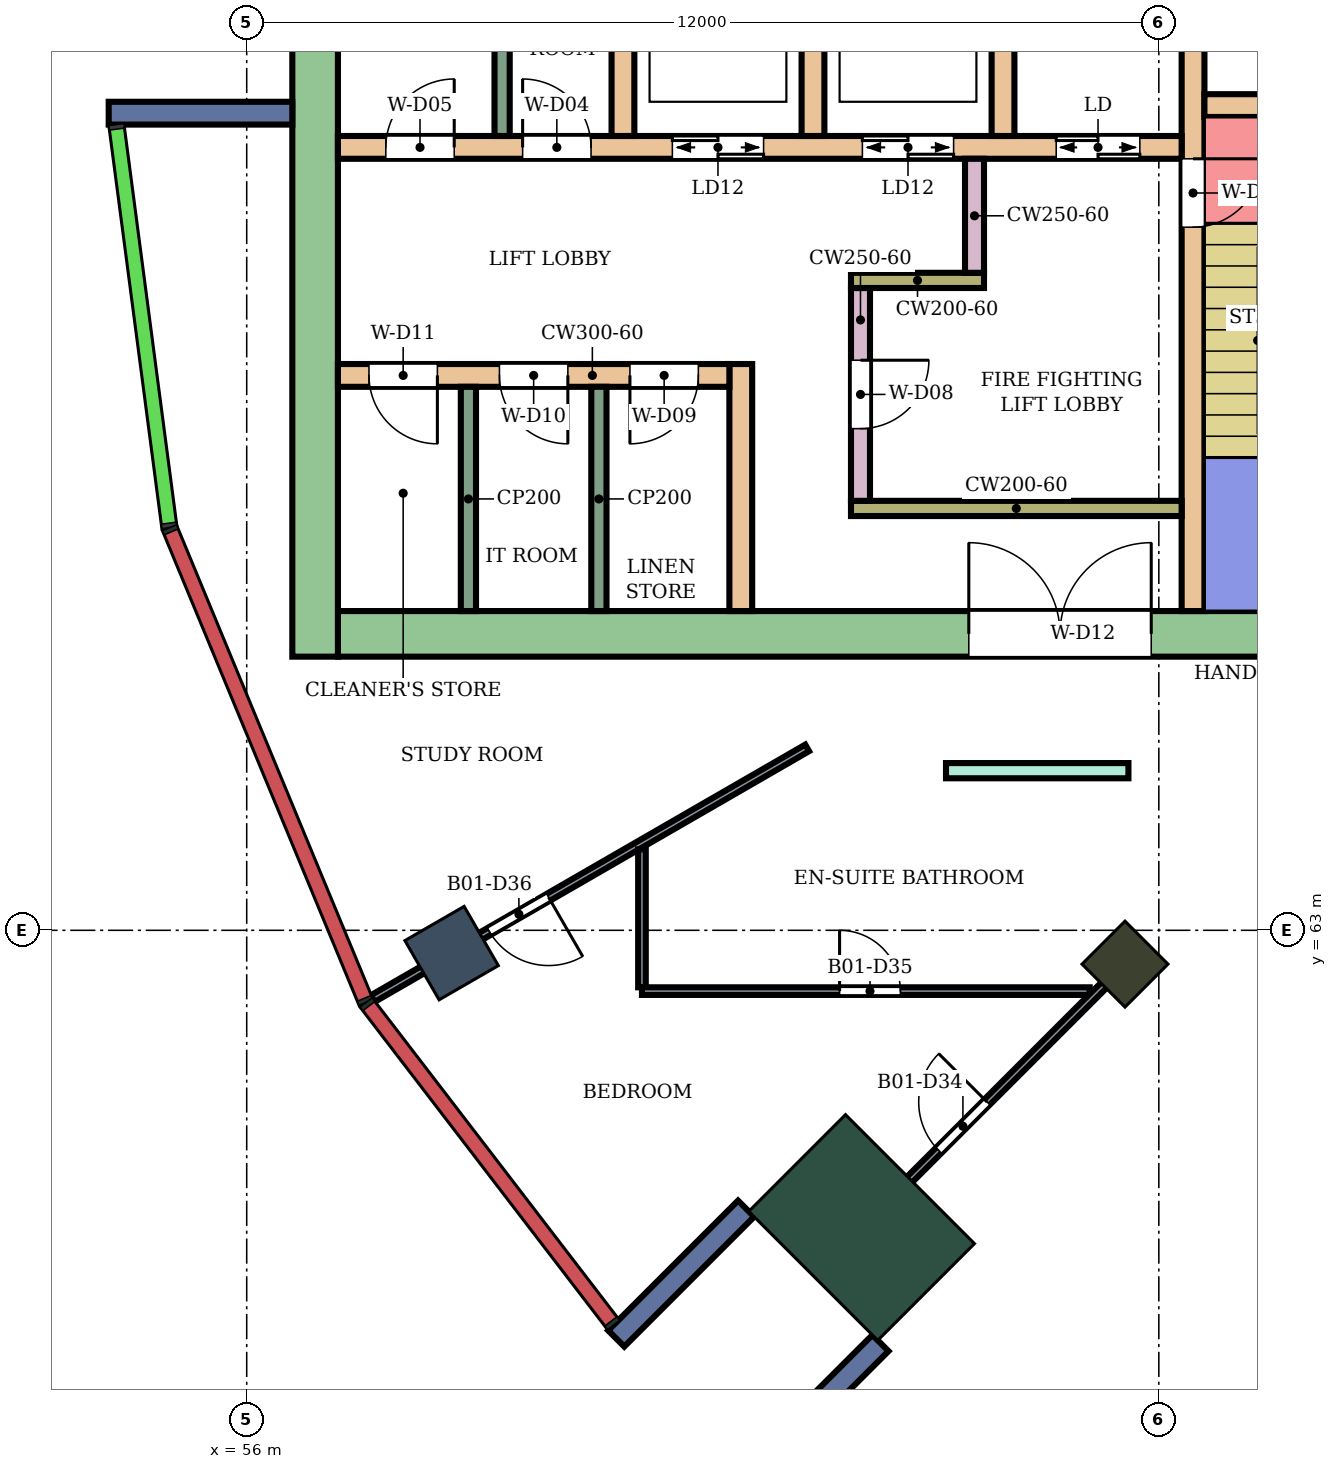
"""IFC4 building model, lengths in metres.
Left out: names, types, materials, properties, quantities, classifications, styles, units other than length and angle.
Written with IfcOpenShell. Run it as: python <this file> out.ifc"""

import sys

from ifc_helpers import new_model, si_unit, direction, frame, frame_2d, origin, origin_2d, place, context, subcontext, project, spatial, rectangle, extrude, element, fill, save


model = new_model("IFC4")
c1 = context("Model", 3, precision=1e-05, world=origin(), true_north=direction((0.0, 1.0)))
c2 = subcontext(c1, "Body", "Model", "MODEL_VIEW")
j1 = project(units=[si_unit("LENGTHUNIT", "METRE"), si_unit("PLANEANGLEUNIT", "RADIAN")], contexts=[c1])
p1 = place(None, origin())
s1 = spatial("IfcSite", under=j1, at=p1, CompositionType="ELEMENT")
p2 = place(p1, origin())
s2 = spatial("IfcBuilding", under=s1, at=p2, CompositionType="ELEMENT")
p3 = place(p2, frame((0.0, 0.0, 216.7)))
s3 = spatial("IfcBuildingStorey", under=s2, at=p3, CompositionType="ELEMENT", Elevation=216.7)
p4 = place(p3, frame((58.696, 62.7, 0.0), z_axis=(0.0, 0.0, 1.0), x_axis=(-0.866025403784, -0.5, 0.0)))
e1 = element("IfcColumn", 1, at=p4, inside=s3, PredefinedType="COLUMN", context=c2, shape_type="SweptSolid", body=[
    extrude(rectangle(XDim=0.9, YDim=0.9, at=origin_2d()), origin(), (0.0, 0.0, 1.0), 4.2),
])
p5 = place(p3, frame((67.555, 62.555, 0.0), z_axis=(0.0, 0.0, 1.0), x_axis=(-0.707106781187, -0.707106781187, 0.0)))
e2 = element("IfcColumn", 2, at=p5, inside=s3, PredefinedType="COLUMN", context=c2, shape_type="SweptSolid", body=[
    extrude(rectangle(XDim=0.8, YDim=0.8, at=origin_2d()), origin(), (0.0, 0.0, 1.0), 4.2),
])
p6 = place(p3, frame((64.09, 59.09, 0.0), z_axis=(0.0, 0.0, 1.0), x_axis=(-0.707106781187, -0.707106781187, 0.0)))
e3 = element("IfcColumn", 3, at=p6, inside=s3, PredefinedType="COLUMN", context=c2, shape_type="SweptSolid", body=[
    extrude(rectangle(XDim=1.8, YDim=2.4, at=origin_2d()), origin(), (0.0, 0.0, 1.0), 4.2),
])
p7 = place(p3, frame((72.1, 66.9, 0.0), z_axis=(0.0, 0.0, 1.0), x_axis=(-1.0, 0.0, 0.0)))
e4 = element("IfcWall", 4, at=p7, inside=s3, PredefinedType="SHEAR", context=c2, shape_type="SweptSolid", body=[
    extrude(rectangle(XDim=14.9, YDim=0.6, at=frame_2d((7.45, 0.0))), origin(), (0.0, 0.0, 1.0), 3.88),
])
p8 = place(p7, frame((4.2, 0.0, 0.0)))
e5 = element("IfcOpeningElement", 5, at=p8, cuts=e4, PredefinedType="OPENING", context=c2, shape_type="SweptSolid", body=[
    extrude(rectangle(XDim=2.4, YDim=2.4, at=frame_2d((1.2, 1.2))), frame((0.0, 0.31, 0.0), z_axis=(0.0, -1.0, 0.0), x_axis=(1.0, 0.0, 0.0)), (0.0, 0.0, 1.0), 0.62),
])
p9 = place(p3, frame((56.9, 83.4, 0.0), z_axis=(0.0, 0.0, 1.0), x_axis=(0.0, -1.0, 0.0)))
e6 = element("IfcWall", 6, at=p9, inside=s3, PredefinedType="SHEAR", context=c2, shape_type="SweptSolid", body=[
    extrude(rectangle(XDim=16.8, YDim=0.6, at=frame_2d((8.4, 0.0))), origin(), (0.0, 0.0, 1.0), 3.88),
])
p10 = place(p3, frame((68.45, 75.0, 0.0), z_axis=(0.0, 0.0, 1.0), x_axis=(0.0, -1.0, 0.0)))
e7 = element("IfcWall", 7, at=p10, inside=s3, PredefinedType="SHEAR", context=c2, shape_type="SweptSolid", body=[
    extrude(rectangle(XDim=7.8, YDim=0.3, at=frame_2d((3.9, 0.0))), origin(), (0.0, 0.0, 1.0), 3.88),
])
p11 = place(p10, frame((1.85, 0.0, 0.0)))
e8 = element("IfcOpeningElement", 8, at=p11, cuts=e7, PredefinedType="OPENING", context=c2, shape_type="SweptSolid", body=[
    extrude(rectangle(XDim=0.9, YDim=2.1, at=frame_2d((0.45, 1.05))), frame((0.0, 0.16, 0.0), z_axis=(0.0, -1.0, 0.0), x_axis=(1.0, 0.0, 0.0)), (0.0, 0.0, 1.0), 0.32),
])
p12 = place(p3, frame((71.65, 73.85, 0.0), z_axis=(0.0, 0.0, 1.0), x_axis=(-1.0, 0.0, 0.0)))
e9 = element("IfcWall", 9, at=p12, inside=s3, PredefinedType="SHEAR", context=c2, shape_type="SweptSolid", body=[
    extrude(rectangle(XDim=3.05, YDim=0.3, at=frame_2d((1.525, 0.0))), origin(), (0.0, 0.0, 1.0), 3.88),
])
p13 = place(p12, frame((1.1, 0.0, 0.0)))
e10 = element("IfcOpeningElement", 10, at=p13, cuts=e9, PredefinedType="OPENING", context=c2, shape_type="SweptSolid", body=[
    extrude(rectangle(XDim=0.7, YDim=2.0, at=frame_2d((0.35, 1.0))), frame((0.0, 0.16, 0.0), z_axis=(0.0, -1.0, 0.0), x_axis=(1.0, 0.0, 0.0)), (0.0, 0.0, 1.0), 0.32),
])
p14 = place(p3, frame((68.3, 73.3, 0.0), z_axis=(0.0, 0.0, 1.0), x_axis=(-1.0, 0.0, 0.0)))
e11 = element("IfcWall", 11, at=p14, inside=s3, PredefinedType="SHEAR", context=c2, shape_type="SweptSolid", body=[
    extrude(rectangle(XDim=11.1, YDim=0.3, at=frame_2d((5.55, 0.0))), origin(), (0.0, 0.0, 1.0), 3.88),
])
p15 = place(p14, frame((0.55, 0.0, 0.0)))
e12 = element("IfcOpeningElement", 12, at=p15, cuts=e11, PredefinedType="OPENING", context=c2, shape_type="SweptSolid", body=[
    extrude(rectangle(XDim=1.1, YDim=2.1, at=frame_2d((0.55, 1.05))), frame((0.0, 0.16, 0.0), z_axis=(0.0, -1.0, 0.0), x_axis=(1.0, 0.0, 0.0)), (0.0, 0.0, 1.0), 0.32),
])
p16 = place(p14, frame((3.0, 0.0, 0.0)))
e13 = element("IfcOpeningElement", 13, at=p16, cuts=e11, PredefinedType="OPENING", context=c2, shape_type="SweptSolid", body=[
    extrude(rectangle(XDim=1.2, YDim=2.1, at=frame_2d((0.6, 1.05))), frame((0.0, 0.16, 0.0), z_axis=(0.0, -1.0, 0.0), x_axis=(1.0, 0.0, 0.0)), (0.0, 0.0, 1.0), 0.32),
])
p17 = place(p14, frame((5.5, 0.0, 0.0)))
e14 = element("IfcOpeningElement", 14, at=p17, cuts=e11, PredefinedType="OPENING", context=c2, shape_type="SweptSolid", body=[
    extrude(rectangle(XDim=1.2, YDim=2.1, at=frame_2d((0.6, 1.05))), frame((0.0, 0.16, 0.0), z_axis=(0.0, -1.0, 0.0), x_axis=(1.0, 0.0, 0.0)), (0.0, 0.0, 1.0), 0.32),
])
p18 = place(p14, frame((7.77, 0.0, 0.0)))
e15 = element("IfcOpeningElement", 15, at=p18, cuts=e11, PredefinedType="OPENING", context=c2, shape_type="SweptSolid", body=[
    extrude(rectangle(XDim=0.9, YDim=2.1, at=frame_2d((0.45, 1.05))), frame((0.0, 0.16, 0.0), z_axis=(0.0, -1.0, 0.0), x_axis=(1.0, 0.0, 0.0)), (0.0, 0.0, 1.0), 0.32),
])
p19 = place(p14, frame((9.57, 0.0, 0.0)))
e16 = element("IfcOpeningElement", 16, at=p19, cuts=e11, PredefinedType="OPENING", context=c2, shape_type="SweptSolid", body=[
    extrude(rectangle(XDim=0.9, YDim=2.1, at=frame_2d((0.45, 1.05))), frame((0.0, 0.16, 0.0), z_axis=(0.0, -1.0, 0.0), x_axis=(1.0, 0.0, 0.0)), (0.0, 0.0, 1.0), 0.32),
])
for number, where, z_axis, x_axis in (
    (17, (65.95, 76.0, 0.0), (0.0, 0.0, 1.0), (0.0, -1.0, 0.0)),
    (18, (63.45, 76.0, 0.0), (0.0, 0.0, 1.0), (0.0, -1.0, 0.0)),
    (19, (60.95, 76.0, 0.0), (0.0, 0.0, 1.0), (0.0, -1.0, 0.0)),
):
    element("IfcWall", number, at=place(p3, frame(where, z_axis=z_axis, x_axis=x_axis)), inside=s3, PredefinedType="SHEAR", context=c2, shape_type="SweptSolid", body=[
        extrude(rectangle(XDim=2.55, YDim=0.3, at=frame_2d((1.275, 0.0))), origin(), (0.0, 0.0, 1.0), 3.88),
    ])
p20 = place(p3, frame((68.3, 68.55, 0.0), z_axis=(0.0, 0.0, 1.0), x_axis=(-1.0, 0.0, 0.0)))
e20 = element("IfcWall", 20, at=p20, inside=s3, PredefinedType="SHEAR", context=c2, shape_type="SweptSolid", body=[
    extrude(rectangle(XDim=4.35, YDim=0.2, at=frame_2d((2.175, 0.0))), origin(), (0.0, 0.0, 1.0), 3.88),
])
p21 = place(p3, frame((64.075, 71.45, 0.0), z_axis=(0.0, 0.0, 1.0), x_axis=(0.0, -1.0, 0.0)))
e21 = element("IfcWall", 21, at=p21, inside=s3, PredefinedType="SHEAR", context=c2, shape_type="SweptSolid", body=[
    extrude(rectangle(XDim=2.8, YDim=0.25, at=frame_2d((1.4, 0.0))), origin(), (0.0, 0.0, 1.0), 3.88),
])
p22 = place(p21, frame((0.95, 0.0, 0.0)))
e22 = element("IfcOpeningElement", 22, at=p22, cuts=e21, PredefinedType="OPENING", context=c2, shape_type="SweptSolid", body=[
    extrude(rectangle(XDim=0.9, YDim=2.1, at=frame_2d((0.45, 1.05))), frame((0.0, 0.135, 0.0), z_axis=(0.0, -1.0, 0.0), x_axis=(1.0, 0.0, 0.0)), (0.0, 0.0, 1.0), 0.27),
])
p23 = place(p3, frame((65.7, 71.55, 0.0), z_axis=(0.0, 0.0, 1.0), x_axis=(-1.0, 0.0, 0.0)))
e23 = element("IfcWall", 23, at=p23, inside=s3, PredefinedType="SHEAR", context=c2, shape_type="SweptSolid", body=[
    extrude(rectangle(XDim=1.75, YDim=0.2, at=frame_2d((0.875, 0.0))), origin(), (0.0, 0.0, 1.0), 3.88),
])
p24 = place(p3, frame((65.575, 73.15, 0.0), z_axis=(0.0, 0.0, 1.0), x_axis=(0.0, -1.0, 0.0)))
e24 = element("IfcWall", 24, at=p24, inside=s3, PredefinedType="SHEAR", context=c2, shape_type="SweptSolid", body=[
    extrude(rectangle(XDim=1.5, YDim=0.25, at=frame_2d((0.75, 0.0))), origin(), (0.0, 0.0, 1.0), 3.88),
])
p25 = place(p3, frame((62.5, 70.45, 0.0), z_axis=(0.0, 0.0, 1.0), x_axis=(0.0, -1.0, 0.0)))
e25 = element("IfcWall", 25, at=p25, inside=s3, PredefinedType="SHEAR", context=c2, shape_type="SweptSolid", body=[
    extrude(rectangle(XDim=3.25, YDim=0.3, at=frame_2d((1.625, 0.0))), origin(), (0.0, 0.0, 1.0), 3.88),
])
p26 = place(p3, frame((62.35, 70.3, 0.0), z_axis=(0.0, 0.0, 1.0), x_axis=(-1.0, 0.0, 0.0)))
e26 = element("IfcWall", 26, at=p26, inside=s3, PredefinedType="SHEAR", context=c2, shape_type="SweptSolid", body=[
    extrude(rectangle(XDim=5.15, YDim=0.3, at=frame_2d((2.575, 0.0))), origin(), (0.0, 0.0, 1.0), 3.88),
])
p27 = place(p26, frame((0.408, 0.0, 0.0)))
e27 = element("IfcOpeningElement", 27, at=p27, cuts=e26, PredefinedType="OPENING", context=c2, shape_type="SweptSolid", body=[
    extrude(rectangle(XDim=0.9, YDim=2.1, at=frame_2d((0.45, 1.05))), frame((0.0, 0.16, 0.0), z_axis=(0.0, -1.0, 0.0), x_axis=(1.0, 0.0, 0.0)), (0.0, 0.0, 1.0), 0.32),
])
p28 = place(p26, frame((2.125, 0.0, 0.0)))
e28 = element("IfcOpeningElement", 28, at=p28, cuts=e26, PredefinedType="OPENING", context=c2, shape_type="SweptSolid", body=[
    extrude(rectangle(XDim=0.9, YDim=2.1, at=frame_2d((0.45, 1.05))), frame((0.0, 0.16, 0.0), z_axis=(0.0, -1.0, 0.0), x_axis=(1.0, 0.0, 0.0)), (0.0, 0.0, 1.0), 0.32),
])
p29 = place(p26, frame((3.842, 0.0, 0.0)))
e29 = element("IfcOpeningElement", 29, at=p29, cuts=e26, PredefinedType="OPENING", context=c2, shape_type="SweptSolid", body=[
    extrude(rectangle(XDim=0.9, YDim=2.1, at=frame_2d((0.45, 1.05))), frame((0.0, 0.16, 0.0), z_axis=(0.0, -1.0, 0.0), x_axis=(1.0, 0.0, 0.0)), (0.0, 0.0, 1.0), 0.32),
])
for number, where, z_axis, x_axis in (
    (30, (56.6, 73.75, 0.0), (0.0, 0.0, 1.0), (-1.0, 0.0, 0.0)),
    (31, (62.57, 59.338, 0.0), (0.0, 0.0, 1.0), (-0.707, -0.707, 0.0)),
    (32, (64.338, 57.57, 0.0), (0.0, 0.0, 1.0), (-0.707, -0.707, 0.0)),
):
    element("IfcWall", number, at=place(p3, frame(where, z_axis=z_axis, x_axis=x_axis)), inside=s3, PredefinedType="NOTDEFINED", context=c2, shape_type="SweptSolid", body=[
        extrude(rectangle(XDim=2.416, YDim=0.3, at=frame_2d((1.208, 0.0))), origin(), (0.0, 0.0, 1.0), 4.2),
    ])
p30 = place(p3, frame((65.2, 65.1, 0.0), z_axis=(0.0, 0.0, 1.0), x_axis=(1.0, 0.0, 0.0)))
e33 = element("IfcWall", 33, at=p30, inside=s3, PredefinedType="PARTITIONING", context=c2, shape_type="SweptSolid", body=[
    extrude(rectangle(XDim=2.4, YDim=0.2, at=frame_2d((1.2, 0.0))), origin(), (0.0, 0.0, 1.0), 3.75),
])
p31 = place(p3, frame((67.099, 52.66, 0.0), z_axis=(0.0, 0.0, 1.0), x_axis=(0.500120472712, 0.865955837658, 0.0)))
e34 = element("IfcWall", 34, at=p31, inside=s3, PredefinedType="PARTITIONING", context=c2, shape_type="SweptSolid", body=[
    extrude(rectangle(XDim=12.866, YDim=0.2, at=frame_2d((6.433, 0.0))), origin(), (0.0, 0.0, 1.0), 3.75),
])
p32 = place(p3, frame((57.658, 62.102, 0.0), z_axis=(0.0, 0.0, 1.0), x_axis=(0.866131372301, 0.499816412211, 0.0)))
e35 = element("IfcWall", 35, at=p32, inside=s3, PredefinedType="PARTITIONING", context=c2, shape_type="SweptSolid", body=[
    extrude(rectangle(XDim=6.598, YDim=0.1, at=frame_2d((3.299, 0.0))), origin(), (0.0, 0.0, 1.0), 3.75),
])
p33 = place(p32, frame((1.77, 0.0, 0.0)))
e36 = element("IfcOpeningElement", 36, at=p33, cuts=e35, PredefinedType="OPENING", context=c2, shape_type="SweptSolid", body=[
    extrude(rectangle(XDim=0.9, YDim=2.1, at=frame_2d((0.45, 1.05))), frame((0.0, 0.06, 0.0), z_axis=(0.0, -1.0, 0.0), x_axis=(1.0, 0.0, 0.0)), (0.0, 0.0, 1.0), 0.12),
])
p34 = place(p3, frame((61.2, 62.25, 0.0), z_axis=(0.0, 0.0, 1.0), x_axis=(0.0, 1.0, 0.0)))
e37 = element("IfcWall", 37, at=p34, inside=s3, PredefinedType="PARTITIONING", context=c2, shape_type="SweptSolid", body=[
    extrude(rectangle(XDim=1.816, YDim=0.1, at=frame_2d((0.908, 0.0))), origin(), (0.0, 0.0, 1.0), 3.75),
])
p35 = place(p3, frame((61.2, 62.2, 0.0), z_axis=(0.0, 0.0, 1.0), x_axis=(1.0, 0.0, 0.0)))
e38 = element("IfcWall", 38, at=p35, inside=s3, PredefinedType="PARTITIONING", context=c2, shape_type="SweptSolid", body=[
    extrude(rectangle(XDim=5.89, YDim=0.1, at=frame_2d((2.945, 0.0))), origin(), (0.0, 0.0, 1.0), 3.75),
])
p36 = place(p35, frame((2.6, 0.0, 0.0)))
e39 = element("IfcOpeningElement", 39, at=p36, cuts=e38, PredefinedType="OPENING", context=c2, shape_type="SweptSolid", body=[
    extrude(rectangle(XDim=0.8, YDim=2.1, at=frame_2d((0.4, 1.05))), frame((0.0, 0.06, 0.0), z_axis=(0.0, -1.0, 0.0), x_axis=(1.0, 0.0, 0.0)), (0.0, 0.0, 1.0), 0.12),
])
p37 = place(p3, frame((63.596, 58.596, 0.0), z_axis=(0.0, 0.0, 1.0), x_axis=(0.707106781187, 0.707106781187, 0.0)))
e40 = element("IfcWall", 40, at=p37, inside=s3, PredefinedType="PARTITIONING", context=c2, shape_type="SweptSolid", body=[
    extrude(rectangle(XDim=5.663, YDim=0.1, at=frame_2d((2.832, 0.0))), origin(), (0.0, 0.0, 1.0), 3.75),
])
p38 = place(p37, frame((2.134, 0.0, 0.0)))
e41 = element("IfcOpeningElement", 41, at=p38, cuts=e40, PredefinedType="OPENING", context=c2, shape_type="SweptSolid", body=[
    extrude(rectangle(XDim=0.9, YDim=2.1, at=frame_2d((0.45, 1.05))), frame((0.0, 0.06, 0.0), z_axis=(0.0, -1.0, 0.0), x_axis=(1.0, 0.0, 0.0)), (0.0, 0.0, 1.0), 0.12),
])
p39 = place(p3, frame((59.36, 76.0, 0.0), z_axis=(0.0, 0.0, 1.0), x_axis=(0.0, -1.0, 0.0)))
e42 = element("IfcWall", 42, at=p39, inside=s3, PredefinedType="PARTITIONING", context=c2, shape_type="SweptSolid", body=[
    extrude(rectangle(XDim=2.55, YDim=0.2, at=frame_2d((1.275, 0.0))), origin(), (0.0, 0.0, 1.0), 3.88),
])
for number, where, z_axis, x_axis in (
    (43, (60.633, 70.15, 0.0), (0.0, 0.0, 1.0), (0.0, -1.0, 0.0)),
    (44, (58.917, 70.15, 0.0), (0.0, 0.0, 1.0), (0.0, -1.0, 0.0)),
):
    element("IfcWall", number, at=place(p3, frame(where, z_axis=z_axis, x_axis=x_axis)), inside=s3, PredefinedType="PARTITIONING", context=c2, shape_type="SweptSolid", body=[
        extrude(rectangle(XDim=2.95, YDim=0.2, at=frame_2d((1.475, 0.0))), origin(), (0.0, 0.0, 1.0), 3.88),
    ])
p40 = place(p38, origin())
e45 = element("IfcDoor", 45, at=p40, inside=s3, OperationType="SINGLE_SWING_RIGHT", PredefinedType="DOOR", context=c2, shape_type="SweptSolid", body=[
    extrude(rectangle(XDim=0.9, YDim=2.1, at=frame_2d((0.45, 1.05))), frame((0.0, 0.025, 0.0), z_axis=(0.0, -1.0, 0.0), x_axis=(1.0, 0.0, 0.0)), (0.0, 0.0, 1.0), 0.05),
])
fill(e41, e45)
p41 = place(p36, origin())
e46 = element("IfcDoor", 46, at=p41, inside=s3, OperationType="SINGLE_SWING_LEFT", PredefinedType="DOOR", context=c2, shape_type="SweptSolid", body=[
    extrude(rectangle(XDim=0.8, YDim=2.1, at=frame_2d((0.4, 1.05))), frame((0.0, 0.025, 0.0), z_axis=(0.0, -1.0, 0.0), x_axis=(1.0, 0.0, 0.0)), (0.0, 0.0, 1.0), 0.05),
])
fill(e39, e46)
p42 = place(p33, frame((0.9, 0.0, 0.0), z_axis=(0.0, 0.0, 1.0), x_axis=(-1.0, 0.0, 0.0)))
e47 = element("IfcDoor", 47, at=p42, inside=s3, OperationType="SINGLE_SWING_LEFT", PredefinedType="DOOR", context=c2, shape_type="SweptSolid", body=[
    extrude(rectangle(XDim=0.9, YDim=2.1, at=frame_2d((0.45, 1.05))), frame((0.0, 0.025, 0.0), z_axis=(0.0, -1.0, 0.0), x_axis=(1.0, 0.0, 0.0)), (0.0, 0.0, 1.0), 0.05),
])
fill(e36, e47)
p43 = place(p11, origin())
e48 = element("IfcDoor", 48, at=p43, inside=s3, OperationType="SINGLE_SWING_LEFT", PredefinedType="DOOR", context=c2, shape_type="SweptSolid", body=[
    extrude(rectangle(XDim=0.9, YDim=2.1, at=frame_2d((0.45, 1.05))), frame((0.0, 0.025, 0.0), z_axis=(0.0, -1.0, 0.0), x_axis=(1.0, 0.0, 0.0)), (0.0, 0.0, 1.0), 0.05),
])
fill(e8, e48)
p44 = place(p15, origin())
e49 = element("IfcDoor", 49, at=p44, inside=s3, OperationType="DOUBLE_DOOR_SLIDING", PredefinedType="DOOR", context=c2, shape_type="SweptSolid", body=[
    extrude(rectangle(XDim=1.1, YDim=2.1, at=frame_2d((0.55, 1.05))), frame((0.0, 0.025, 0.0), z_axis=(0.0, -1.0, 0.0), x_axis=(1.0, 0.0, 0.0)), (0.0, 0.0, 1.0), 0.05),
])
fill(e12, e49)
p45 = place(p16, origin())
e50 = element("IfcDoor", 50, at=p45, inside=s3, OperationType="DOUBLE_DOOR_SLIDING", PredefinedType="DOOR", context=c2, shape_type="SweptSolid", body=[
    extrude(rectangle(XDim=1.2, YDim=2.1, at=frame_2d((0.6, 1.05))), frame((0.0, 0.025, 0.0), z_axis=(0.0, -1.0, 0.0), x_axis=(1.0, 0.0, 0.0)), (0.0, 0.0, 1.0), 0.05),
])
fill(e13, e50)
p46 = place(p17, origin())
e51 = element("IfcDoor", 51, at=p46, inside=s3, OperationType="DOUBLE_DOOR_SLIDING", PredefinedType="DOOR", context=c2, shape_type="SweptSolid", body=[
    extrude(rectangle(XDim=1.2, YDim=2.1, at=frame_2d((0.6, 1.05))), frame((0.0, 0.025, 0.0), z_axis=(0.0, -1.0, 0.0), x_axis=(1.0, 0.0, 0.0)), (0.0, 0.0, 1.0), 0.05),
])
fill(e14, e51)
p47 = place(p18, frame((0.9, 0.0, 0.0), z_axis=(0.0, 0.0, 1.0), x_axis=(-1.0, 0.0, 0.0)))
e52 = element("IfcDoor", 52, at=p47, inside=s3, OperationType="SINGLE_SWING_LEFT", PredefinedType="DOOR", context=c2, shape_type="SweptSolid", body=[
    extrude(rectangle(XDim=0.9, YDim=2.1, at=frame_2d((0.45, 1.05))), frame((0.0, 0.025, 0.0), z_axis=(0.0, -1.0, 0.0), x_axis=(1.0, 0.0, 0.0)), (0.0, 0.0, 1.0), 0.05),
])
fill(e15, e52)
p48 = place(p19, frame((0.9, 0.0, 0.0), z_axis=(0.0, 0.0, 1.0), x_axis=(-1.0, 0.0, 0.0)))
e53 = element("IfcDoor", 53, at=p48, inside=s3, OperationType="SINGLE_SWING_RIGHT", PredefinedType="DOOR", context=c2, shape_type="SweptSolid", body=[
    extrude(rectangle(XDim=0.9, YDim=2.1, at=frame_2d((0.45, 1.05))), frame((0.0, 0.025, 0.0), z_axis=(0.0, -1.0, 0.0), x_axis=(1.0, 0.0, 0.0)), (0.0, 0.0, 1.0), 0.05),
])
fill(e16, e53)
p49 = place(p22, origin())
e54 = element("IfcDoor", 54, at=p49, inside=s3, OperationType="SINGLE_SWING_LEFT", PredefinedType="DOOR", context=c2, shape_type="SweptSolid", body=[
    extrude(rectangle(XDim=0.9, YDim=2.1, at=frame_2d((0.45, 1.05))), frame((0.0, 0.025, 0.0), z_axis=(0.0, -1.0, 0.0), x_axis=(1.0, 0.0, 0.0)), (0.0, 0.0, 1.0), 0.05),
])
fill(e22, e54)
p50 = place(p27, origin())
e55 = element("IfcDoor", 55, at=p50, inside=s3, OperationType="SINGLE_SWING_RIGHT", PredefinedType="DOOR", context=c2, shape_type="SweptSolid", body=[
    extrude(rectangle(XDim=0.9, YDim=2.1, at=frame_2d((0.45, 1.05))), frame((0.0, 0.025, 0.0), z_axis=(0.0, -1.0, 0.0), x_axis=(1.0, 0.0, 0.0)), (0.0, 0.0, 1.0), 0.05),
])
fill(e27, e55)
p51 = place(p28, origin())
e56 = element("IfcDoor", 56, at=p51, inside=s3, OperationType="SINGLE_SWING_LEFT", PredefinedType="DOOR", context=c2, shape_type="SweptSolid", body=[
    extrude(rectangle(XDim=0.9, YDim=2.1, at=frame_2d((0.45, 1.05))), frame((0.0, 0.025, 0.0), z_axis=(0.0, -1.0, 0.0), x_axis=(1.0, 0.0, 0.0)), (0.0, 0.0, 1.0), 0.05),
])
fill(e28, e56)
p52 = place(p29, origin())
e57 = element("IfcDoor", 57, at=p52, inside=s3, OperationType="SINGLE_SWING_LEFT", PredefinedType="DOOR", context=c2, shape_type="SweptSolid", body=[
    extrude(rectangle(XDim=0.9, YDim=2.1, at=frame_2d((0.45, 1.05))), frame((0.0, 0.025, 0.0), z_axis=(0.0, -1.0, 0.0), x_axis=(1.0, 0.0, 0.0)), (0.0, 0.0, 1.0), 0.05),
])
fill(e29, e57)
p53 = place(p8, frame((2.4, 0.0, 0.0), z_axis=(0.0, 0.0, 1.0), x_axis=(-1.0, 0.0, 0.0)))
e58 = element("IfcDoor", 58, at=p53, inside=s3, OperationType="DOUBLE_DOOR_SINGLE_SWING", PredefinedType="DOOR", context=c2, shape_type="SweptSolid", body=[
    extrude(rectangle(XDim=2.4, YDim=2.4, at=frame_2d((1.2, 1.2))), frame((0.0, 0.025, 0.0), z_axis=(0.0, -1.0, 0.0), x_axis=(1.0, 0.0, 0.0)), (0.0, 0.0, 1.0), 0.05),
])
fill(e5, e58)
save(model, sys.argv[1])
